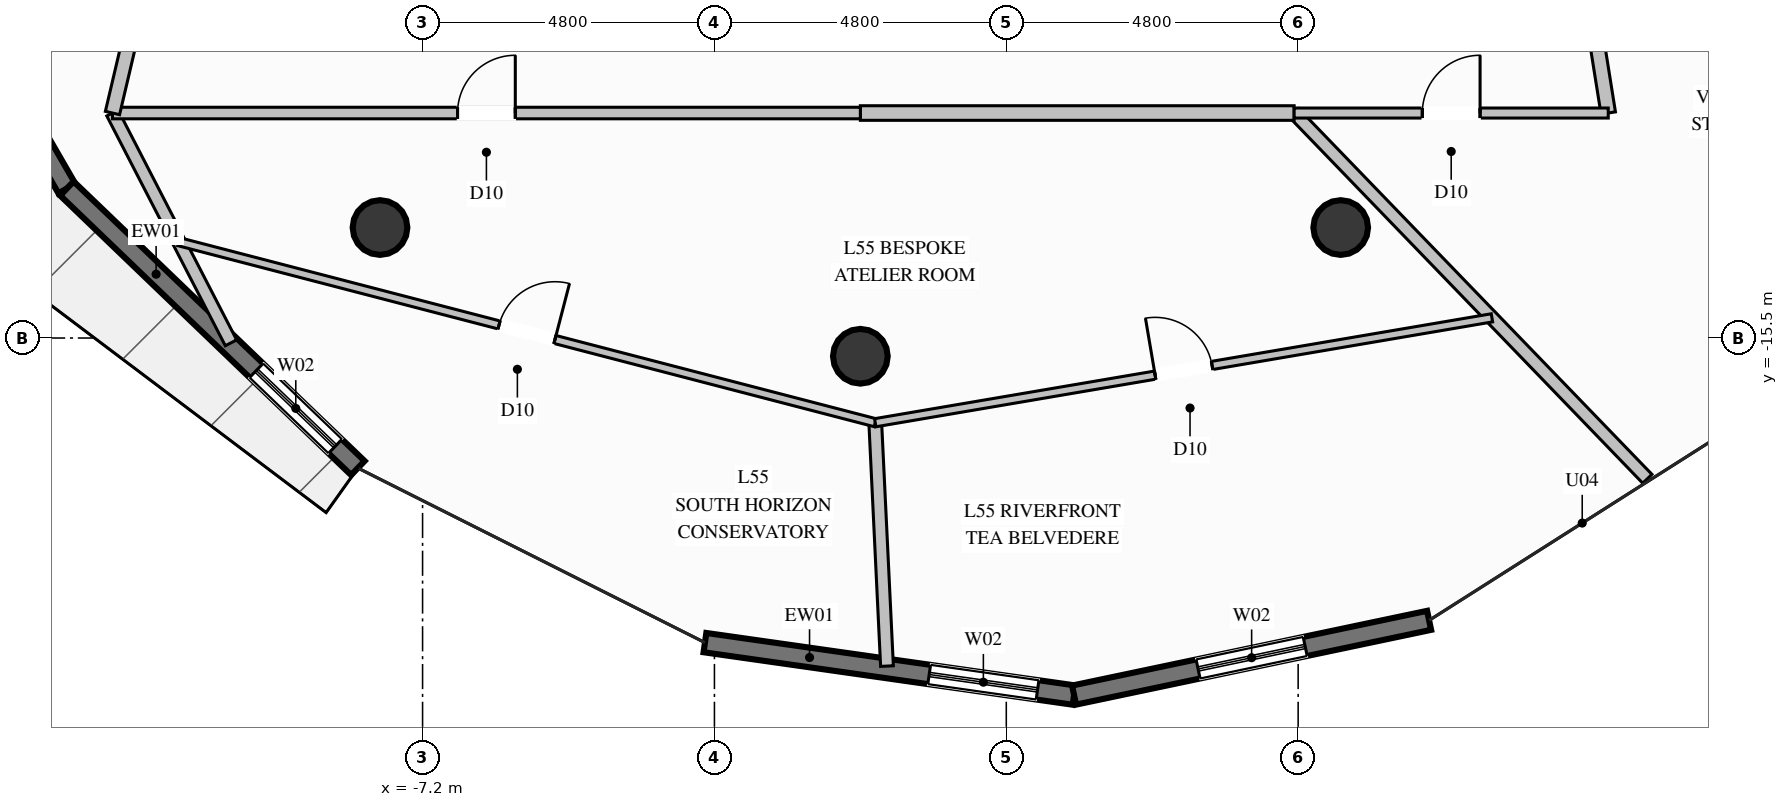
"""IFC4 building model, lengths in metres.
Left out: names, types, materials, properties, quantities, classifications, styles, units other than length and angle.
Written with IfcOpenShell. Run it as: python <this file> out.ifc"""

import sys

from ifc_helpers import new_model, si_unit, direction, frame, frame_2d, origin, origin_2d, place, context, subcontext, project, spatial, rectangle, circle, extrude, element, fill, save


model = new_model("IFC4")
c1 = context("Model", 3, precision=1e-05, world=origin(), true_north=direction((0.0, 1.0)))
c2 = subcontext(c1, "Body", "Model", "MODEL_VIEW")
j1 = project(units=[si_unit("LENGTHUNIT", "METRE"), si_unit("PLANEANGLEUNIT", "RADIAN")], contexts=[c1])
p1 = place(None, origin())
s1 = spatial("IfcSite", under=j1, at=p1, CompositionType="ELEMENT")
p2 = place(p1, origin())
s2 = spatial("IfcBuilding", under=s1, at=p2, CompositionType="ELEMENT")
p3 = place(p2, frame((0.0, 0.0, 212.8)))
s3 = spatial("IfcBuildingStorey", under=s2, at=p3, CompositionType="ELEMENT", Elevation=212.8)
for number, where, z_axis, x_axis in (
    (1, (-7.9, -13.683, 0.0), (0.0, 0.0, 1.0), (1.0, 0.0, 0.0)),
    (2, (0.0, -15.8, 0.0), (0.0, 0.0, 1.0), (1.0, 0.0, 0.0)),
    (3, (7.9, -13.683, 0.0), (0.0, 0.0, 1.0), (1.0, 0.0, 0.0)),
):
    element("IfcColumn", number, at=place(p3, frame(where, z_axis=z_axis, x_axis=x_axis)), inside=s3, PredefinedType="COLUMN", context=c2, shape_type="SweptSolid", body=[
        extrude(circle(Radius=0.45, at=origin_2d()), origin(), (0.0, 0.0, 1.0), 3.6),
    ])
p4 = place(p3, frame((-13.05, -13.041, 0.0), z_axis=(0.0, 0.0, 1.0), x_axis=(-0.50061923795, 0.865667591281, 0.0)))
e4 = element("IfcWall", 4, at=p4, inside=s3, PredefinedType="SOLIDWALL", context=c2, shape_type="SweptSolid", body=[
    extrude(rectangle(XDim=6.786, YDim=0.32, at=frame_2d((3.393, 0.0))), origin(), (0.0, 0.0, 1.0), 3.36),
])
p5 = place(p4, frame((1.434, 0.0, 0.35)))
e5 = element("IfcOpeningElement", 5, at=p5, cuts=e4, PredefinedType="OPENING", context=c2, shape_type="SweptSolid", body=[
    extrude(rectangle(XDim=1.8, YDim=2.6, at=frame_2d((0.9, 1.3))), frame((0.0, 0.17, 0.0), z_axis=(0.0, -1.0, 0.0), x_axis=(1.0, 0.0, 0.0)), (0.0, 0.0, 1.0), 0.34),
])
p6 = place(p3, frame((-8.264, -17.638, 0.0), z_axis=(0.0, 0.0, 1.0), x_axis=(-0.721218944664, 0.69270717757, 0.0)))
e6 = element("IfcWall", 6, at=p6, inside=s3, PredefinedType="SOLIDWALL", context=c2, shape_type="SweptSolid", body=[
    extrude(rectangle(XDim=6.636, YDim=0.32, at=frame_2d((3.318, 0.0))), origin(), (0.0, 0.0, 1.0), 3.36),
])
p7 = place(p6, frame((0.516, 0.0, 0.35)))
e7 = element("IfcOpeningElement", 7, at=p7, cuts=e6, PredefinedType="OPENING", context=c2, shape_type="SweptSolid", body=[
    extrude(rectangle(XDim=1.8, YDim=2.6, at=frame_2d((0.9, 1.3))), frame((0.0, 0.17, 0.0), z_axis=(0.0, -1.0, 0.0), x_axis=(1.0, 0.0, 0.0)), (0.0, 0.0, 1.0), 0.34),
])
p8 = place(p3, frame((3.515, -21.372, 0.0), z_axis=(0.0, 0.0, 1.0), x_axis=(-0.990045616764, 0.140746853344, 0.0)))
e8 = element("IfcWall", 8, at=p8, inside=s3, PredefinedType="SOLIDWALL", context=c2, shape_type="SweptSolid", body=[
    extrude(rectangle(XDim=6.132, YDim=0.32, at=frame_2d((3.066, 0.0))), origin(), (0.0, 0.0, 1.0), 3.36),
])
p9 = place(p8, frame((0.607, 0.0, 0.35)))
e9 = element("IfcOpeningElement", 9, at=p9, cuts=e8, PredefinedType="OPENING", context=c2, shape_type="SweptSolid", body=[
    extrude(rectangle(XDim=1.8, YDim=2.6, at=frame_2d((0.9, 1.3))), frame((0.0, 0.17, 0.0), z_axis=(0.0, -1.0, 0.0), x_axis=(1.0, 0.0, 0.0)), (0.0, 0.0, 1.0), 0.34),
])
p10 = place(p3, frame((9.354, -20.143, 0.0), z_axis=(0.0, 0.0, 1.0), x_axis=(-0.97855933434, -0.205965116405, 0.0)))
e10 = element("IfcWall", 10, at=p10, inside=s3, PredefinedType="SOLIDWALL", context=c2, shape_type="SweptSolid", body=[
    extrude(rectangle(XDim=5.967, YDim=0.32, at=frame_2d((2.983, 0.0))), origin(), (0.0, 0.0, 1.0), 3.36),
])
p11 = place(p10, frame((2.083, 0.0, 0.35)))
e11 = element("IfcOpeningElement", 11, at=p11, cuts=e10, PredefinedType="OPENING", context=c2, shape_type="SweptSolid", body=[
    extrude(rectangle(XDim=1.8, YDim=2.6, at=frame_2d((0.9, 1.3))), frame((0.0, 0.17, 0.0), z_axis=(0.0, -1.0, 0.0), x_axis=(1.0, 0.0, 0.0)), (0.0, 0.0, 1.0), 0.34),
])
p12 = place(p3, frame((7.134, -11.8, 0.0), z_axis=(0.0, 0.0, 1.0), x_axis=(0.694693504574, -0.71930587006, 0.0)))
e12 = element("IfcWall", 12, at=p12, inside=s3, PredefinedType="PARTITIONING", context=c2, shape_type="SweptSolid", body=[
    extrude(rectangle(XDim=8.362, YDim=0.21, at=frame_2d((4.181, 0.0))), origin(), (0.0, 0.0, 1.0), 3.36),
])
p13 = place(p3, frame((-12.3, -11.8, 0.0), z_axis=(0.0, 0.0, 1.0), x_axis=(0.458363547269, -0.888764793708, 0.0)))
e13 = element("IfcWall", 13, at=p13, inside=s3, PredefinedType="PARTITIONING", context=c2, shape_type="SweptSolid", body=[
    extrude(rectangle(XDim=4.252, YDim=0.21, at=frame_2d((2.126, 0.0))), origin(), (0.0, 0.0, 1.0), 3.36),
])
p14 = place(p3, frame((0.0, -11.8, 0.0), z_axis=(0.0, 0.0, 1.0), x_axis=(1.0, 0.0, 0.0)))
e14 = element("IfcWall", 14, at=p14, inside=s3, PredefinedType="PARTITIONING", context=c2, shape_type="SweptSolid", body=[
    extrude(rectangle(XDim=7.134, YDim=0.24, at=frame_2d((3.567, 0.0))), origin(), (0.0, 0.0, 1.0), 3.36),
])
p15 = place(p3, frame((-12.3, -11.8, 0.0), z_axis=(0.0, 0.0, 1.0), x_axis=(1.0, 0.0, 0.0)))
e15 = element("IfcWall", 15, at=p15, inside=s3, PredefinedType="PARTITIONING", context=c2, shape_type="SweptSolid", body=[
    extrude(rectangle(XDim=12.3, YDim=0.19, at=frame_2d((6.15, 0.0))), origin(), (0.0, 0.0, 1.0), 3.36),
])
p16 = place(p15, frame((5.675, 0.0, 0.0)))
e16 = element("IfcOpeningElement", 16, at=p16, cuts=e15, PredefinedType="OPENING", context=c2, shape_type="SweptSolid", body=[
    extrude(rectangle(XDim=0.95, YDim=2.1, at=frame_2d((0.475, 1.05))), frame((0.0, 0.105, 0.0), z_axis=(0.0, -1.0, 0.0), x_axis=(1.0, 0.0, 0.0)), (0.0, 0.0, 1.0), 0.21),
])
p17 = place(p3, frame((-11.058, -6.525, 0.0), z_axis=(0.0, 0.0, 1.0), x_axis=(-0.229167390813, -0.973387028364, 0.0)))
e17 = element("IfcWall", 17, at=p17, inside=s3, PredefinedType="PARTITIONING", context=c2, shape_type="SweptSolid", body=[
    extrude(rectangle(XDim=5.419, YDim=0.24, at=frame_2d((2.71, 0.0))), origin(), (0.0, 0.0, 1.0), 3.36),
])
p18 = place(p17, frame((2.21, 0.0, 0.0)))
e18 = element("IfcOpeningElement", 18, at=p18, cuts=e17, PredefinedType="OPENING", context=c2, shape_type="SweptSolid", body=[
    extrude(rectangle(XDim=1.0, YDim=2.2, at=frame_2d((0.5, 1.1))), frame((0.0, 0.13, 0.0), z_axis=(0.0, -1.0, 0.0), x_axis=(1.0, 0.0, 0.0)), (0.0, 0.0, 1.0), 0.26),
])
p19 = place(p3, frame((0.245, -16.893, 0.0), z_axis=(0.0, 0.0, 1.0), x_axis=(0.048138368388, -0.998840676729, 0.0)))
e19 = element("IfcWall", 19, at=p19, inside=s3, PredefinedType="PARTITIONING", context=c2, shape_type="SweptSolid", body=[
    extrude(rectangle(XDim=4.007, YDim=0.21, at=frame_2d((2.003, 0.0))), origin(), (0.0, 0.0, 1.0), 3.36),
])
p20 = place(p3, frame((-11.209, -13.916, 0.0), z_axis=(0.0, 0.0, 1.0), x_axis=(0.967843403255, -0.251553467032, 0.0)))
e20 = element("IfcWall", 20, at=p20, inside=s3, PredefinedType="PARTITIONING", context=c2, shape_type="SweptSolid", body=[
    extrude(rectangle(XDim=11.835, YDim=0.135, at=frame_2d((5.917, 0.0))), origin(), (0.0, 0.0, 1.0), 3.36),
])
p21 = place(p20, frame((5.442, 0.0, 0.0)))
e21 = element("IfcOpeningElement", 21, at=p21, cuts=e20, PredefinedType="OPENING", context=c2, shape_type="SweptSolid", body=[
    extrude(rectangle(XDim=0.95, YDim=2.1, at=frame_2d((0.475, 1.05))), frame((0.0, 0.078, 0.0), z_axis=(0.0, -1.0, 0.0), x_axis=(1.0, 0.0, 0.0)), (0.0, 0.0, 1.0), 0.155),
])
p22 = place(p3, frame((0.245, -16.893, 0.0), z_axis=(0.0, 0.0, 1.0), x_axis=(0.985840040351, 0.167688445755, 0.0)))
e22 = element("IfcWall", 22, at=p22, inside=s3, PredefinedType="PARTITIONING", context=c2, shape_type="SweptSolid", body=[
    extrude(rectangle(XDim=10.288, YDim=0.135, at=frame_2d((5.144, 0.0))), origin(), (0.0, 0.0, 1.0), 3.36),
])
p23 = place(p22, frame((4.669, 0.0, 0.0)))
e23 = element("IfcOpeningElement", 23, at=p23, cuts=e22, PredefinedType="OPENING", context=c2, shape_type="SweptSolid", body=[
    extrude(rectangle(XDim=0.95, YDim=2.1, at=frame_2d((0.475, 1.05))), frame((0.0, 0.078, 0.0), z_axis=(0.0, -1.0, 0.0), x_axis=(1.0, 0.0, 0.0)), (0.0, 0.0, 1.0), 0.155),
])
p24 = place(p3, frame((12.3, -11.8, 0.0), z_axis=(0.0, 0.0, 1.0), x_axis=(-0.157628647668, 0.987498460472, 0.0)))
e24 = element("IfcWall", 24, at=p24, inside=s3, PredefinedType="PARTITIONING", context=c2, shape_type="SweptSolid", body=[
    extrude(rectangle(XDim=5.342, YDim=0.24, at=frame_2d((2.671, 0.0))), origin(), (0.0, 0.0, 1.0), 3.36),
])
p25 = place(p3, frame((7.134, -11.8, 0.0), z_axis=(0.0, 0.0, 1.0), x_axis=(1.0, 0.0, 0.0)))
e25 = element("IfcWall", 25, at=p25, inside=s3, PredefinedType="PARTITIONING", context=c2, shape_type="SweptSolid", body=[
    extrude(rectangle(XDim=5.166, YDim=0.165, at=frame_2d((2.583, 0.0))), origin(), (0.0, 0.0, 1.0), 3.36),
])
p26 = place(p25, frame((2.108, 0.0, 0.0)))
e26 = element("IfcOpeningElement", 26, at=p26, cuts=e25, PredefinedType="OPENING", context=c2, shape_type="SweptSolid", body=[
    extrude(rectangle(XDim=0.95, YDim=2.1, at=frame_2d((0.475, 1.05))), frame((0.0, 0.093, 0.0), z_axis=(0.0, -1.0, 0.0), x_axis=(1.0, 0.0, 0.0)), (0.0, 0.0, 1.0), 0.185),
])
p27 = place(p7, origin())
e27 = element("IfcWindow", 27, at=p27, inside=s3, PartitioningType="SINGLE_PANEL", PredefinedType="WINDOW", context=c2, shape_type="SweptSolid", body=[
    extrude(rectangle(XDim=1.8, YDim=2.6, at=frame_2d((0.9, 1.3))), frame((0.0, 0.03, 0.0), z_axis=(0.0, -1.0, 0.0), x_axis=(1.0, 0.0, 0.0)), (0.0, 0.0, 1.0), 0.06),
])
fill(e7, e27)
p28 = place(p9, origin())
e28 = element("IfcWindow", 28, at=p28, inside=s3, PartitioningType="SINGLE_PANEL", PredefinedType="WINDOW", context=c2, shape_type="SweptSolid", body=[
    extrude(rectangle(XDim=1.8, YDim=2.6, at=frame_2d((0.9, 1.3))), frame((0.0, 0.03, 0.0), z_axis=(0.0, -1.0, 0.0), x_axis=(1.0, 0.0, 0.0)), (0.0, 0.0, 1.0), 0.06),
])
fill(e9, e28)
p29 = place(p11, origin())
e29 = element("IfcWindow", 29, at=p29, inside=s3, PartitioningType="SINGLE_PANEL", PredefinedType="WINDOW", context=c2, shape_type="SweptSolid", body=[
    extrude(rectangle(XDim=1.8, YDim=2.6, at=frame_2d((0.9, 1.3))), frame((0.0, 0.03, 0.0), z_axis=(0.0, -1.0, 0.0), x_axis=(1.0, 0.0, 0.0)), (0.0, 0.0, 1.0), 0.06),
])
fill(e11, e29)
p30 = place(p16, origin())
e30 = element("IfcDoor", 30, at=p30, inside=s3, OperationType="SINGLE_SWING_RIGHT", PredefinedType="DOOR", context=c2, shape_type="SweptSolid", body=[
    extrude(rectangle(XDim=0.95, YDim=2.1, at=frame_2d((0.475, 1.05))), frame((0.0, 0.025, 0.0), z_axis=(0.0, -1.0, 0.0), x_axis=(1.0, 0.0, 0.0)), (0.0, 0.0, 1.0), 0.05),
])
fill(e16, e30)
p31 = place(p21, origin())
e31 = element("IfcDoor", 31, at=p31, inside=s3, OperationType="SINGLE_SWING_RIGHT", PredefinedType="DOOR", context=c2, shape_type="SweptSolid", body=[
    extrude(rectangle(XDim=0.95, YDim=2.1, at=frame_2d((0.475, 1.05))), frame((0.0, 0.025, 0.0), z_axis=(0.0, -1.0, 0.0), x_axis=(1.0, 0.0, 0.0)), (0.0, 0.0, 1.0), 0.05),
])
fill(e21, e31)
p32 = place(p23, origin())
e32 = element("IfcDoor", 32, at=p32, inside=s3, OperationType="SINGLE_SWING_LEFT", PredefinedType="DOOR", context=c2, shape_type="SweptSolid", body=[
    extrude(rectangle(XDim=0.95, YDim=2.1, at=frame_2d((0.475, 1.05))), frame((0.0, 0.025, 0.0), z_axis=(0.0, -1.0, 0.0), x_axis=(1.0, 0.0, 0.0)), (0.0, 0.0, 1.0), 0.05),
])
fill(e23, e32)
p33 = place(p26, origin())
e33 = element("IfcDoor", 33, at=p33, inside=s3, OperationType="SINGLE_SWING_RIGHT", PredefinedType="DOOR", context=c2, shape_type="SweptSolid", body=[
    extrude(rectangle(XDim=0.95, YDim=2.1, at=frame_2d((0.475, 1.05))), frame((0.0, 0.025, 0.0), z_axis=(0.0, -1.0, 0.0), x_axis=(1.0, 0.0, 0.0)), (0.0, 0.0, 1.0), 0.05),
])
fill(e26, e33)
save(model, sys.argv[1])
